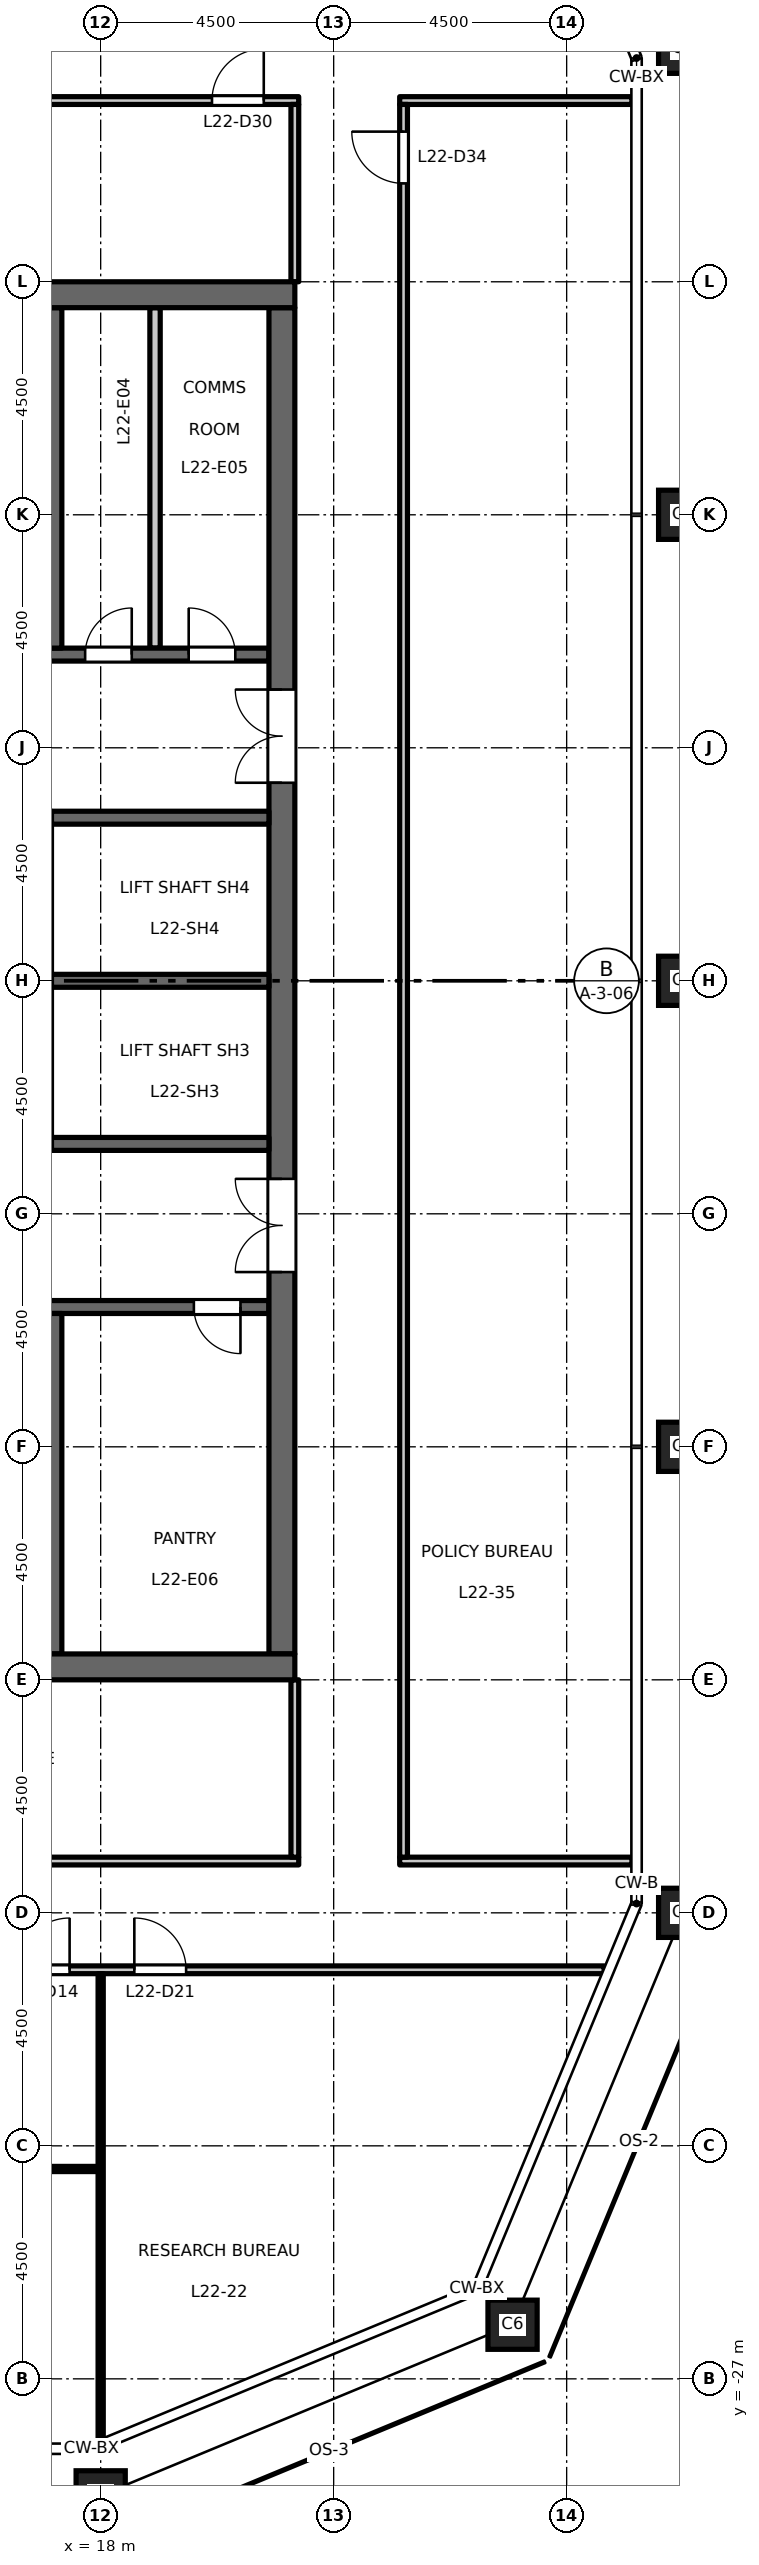
"""IFC4 building model, lengths in metres.
Left out: names, types, materials, properties, quantities, classifications, styles, units other than length and angle.
Written with IfcOpenShell. Run it as: python <this file> out.ifc"""

import sys

from ifc_helpers import new_model, si_unit, direction, frame, frame_2d, origin, origin_2d, place, context, subcontext, project, spatial, rectangle, hollow_rectangle, extrude, element, fill, save


model = new_model("IFC4")
c1 = context("Model", 3, precision=1e-05, world=origin(), true_north=direction((0.0, 1.0)))
c2 = subcontext(c1, "Body", "Model", "MODEL_VIEW")
j1 = project(units=[si_unit("LENGTHUNIT", "METRE"), si_unit("PLANEANGLEUNIT", "RADIAN")], contexts=[c1])
p1 = place(None, origin())
s1 = spatial("IfcSite", under=j1, at=p1, CompositionType="ELEMENT")
p2 = place(p1, origin())
s2 = spatial("IfcBuilding", under=s1, at=p2, CompositionType="ELEMENT")
p3 = place(p2, frame((0.0, 0.0, 104.7)))
s3 = spatial("IfcBuildingStorey", under=s2, at=p3, CompositionType="ELEMENT", Elevation=104.7)
for number, where, z_axis, x_axis in (
    (1, (18.0, -29.25, 0.0), (0.0, 0.0, 1.0), (1.0, 0.0, 0.0)),
    (2, (25.955, -25.955, 0.0), (0.0, 0.0, 1.0), (1.0, 0.0, 0.0)),
    (3, (29.25, -18.0, 0.0), (0.0, 0.0, 1.0), (1.0, 0.0, 0.0)),
    (4, (29.25, -9.0, 0.0), (0.0, 0.0, 1.0), (1.0, 0.0, 0.0)),
    (5, (29.25, 0.0, 0.0), (0.0, 0.0, 1.0), (1.0, 0.0, 0.0)),
    (6, (29.25, 9.0, 0.0), (0.0, 0.0, 1.0), (1.0, 0.0, 0.0)),
    (7, (29.25, 18.0, 0.0), (0.0, 0.0, 1.0), (1.0, 0.0, 0.0)),
):
    element("IfcColumn", number, at=place(p3, frame(where, z_axis=z_axis, x_axis=x_axis)), inside=s3, PredefinedType="COLUMN", context=c2, shape_type="SweptSolid", body=[
        extrude(hollow_rectangle(XDim=0.95, YDim=0.95, WallThickness=0.055, at=origin_2d()), origin(), (0.0, 0.0, 1.0), 4.5),
    ])
p4 = place(p3, frame((17.0, 6.3, 0.0), z_axis=(0.0, 0.0, 1.0), x_axis=(1.0, 0.0, 0.0)))
e8 = element("IfcWall", 8, at=p4, inside=s3, PredefinedType="SHEAR", context=c2, shape_type="SweptSolid", body=[
    extrude(rectangle(XDim=4.25, YDim=0.25, at=frame_2d((2.125, 0.0))), origin(), (0.0, 0.0, 1.0), 4.35),
])
p5 = place(p4, frame((0.7, 0.0, 0.0)))
e9 = element("IfcOpeningElement", 9, at=p5, cuts=e8, PredefinedType="OPENING", context=c2, shape_type="SweptSolid", body=[
    extrude(rectangle(XDim=0.9, YDim=2.1, at=frame_2d((0.45, 1.05))), frame((0.0, 0.135, 0.0), z_axis=(0.0, -1.0, 0.0), x_axis=(1.0, 0.0, 0.0)), (0.0, 0.0, 1.0), 0.27),
])
p6 = place(p4, frame((2.7, 0.0, 0.0)))
e10 = element("IfcOpeningElement", 10, at=p6, cuts=e8, PredefinedType="OPENING", context=c2, shape_type="SweptSolid", body=[
    extrude(rectangle(XDim=0.9, YDim=2.1, at=frame_2d((0.45, 1.05))), frame((0.0, 0.135, 0.0), z_axis=(0.0, -1.0, 0.0), x_axis=(1.0, 0.0, 0.0)), (0.0, 0.0, 1.0), 0.27),
])
p7 = place(p3, frame((12.15, -6.3, 0.0), z_axis=(0.0, 0.0, 1.0), x_axis=(1.0, 0.0, 0.0)))
e11 = element("IfcWall", 11, at=p7, inside=s3, PredefinedType="SHEAR", context=c2, shape_type="SweptSolid", body=[
    extrude(rectangle(XDim=9.1, YDim=0.25, at=frame_2d((4.55, 0.0))), origin(), (0.0, 0.0, 1.0), 4.35),
])
p8 = place(p7, frame((1.8, 0.0, 0.0)))
e12 = element("IfcOpeningElement", 12, at=p8, cuts=e11, PredefinedType="OPENING", context=c2, shape_type="SweptSolid", body=[
    extrude(rectangle(XDim=1.0, YDim=2.1, at=frame_2d((0.5, 1.05))), frame((0.0, 0.135, 0.0), z_axis=(0.0, -1.0, 0.0), x_axis=(1.0, 0.0, 0.0)), (0.0, 0.0, 1.0), 0.27),
])
p9 = place(p7, frame((7.65, 0.0, 0.0)))
e13 = element("IfcOpeningElement", 13, at=p9, cuts=e11, PredefinedType="OPENING", context=c2, shape_type="SweptSolid", body=[
    extrude(rectangle(XDim=0.9, YDim=2.1, at=frame_2d((0.45, 1.05))), frame((0.0, 0.135, 0.0), z_axis=(0.0, -1.0, 0.0), x_axis=(1.0, 0.0, 0.0)), (0.0, 0.0, 1.0), 0.27),
])
p10 = place(p3, frame((21.5, -13.0, 0.0), z_axis=(0.0, 0.0, 1.0), x_axis=(0.0, 1.0, 0.0)))
e14 = element("IfcWall", 14, at=p10, inside=s3, PredefinedType="SHEAR", context=c2, shape_type="SweptSolid", body=[
    extrude(rectangle(XDim=26.0, YDim=0.5, at=frame_2d((13.0, 0.0))), origin(), (0.0, 0.0, 1.0), 4.35),
])
p11 = place(p10, frame((16.825, 0.0, 0.0)))
e15 = element("IfcOpeningElement", 15, at=p11, cuts=e14, PredefinedType="OPENING", context=c2, shape_type="SweptSolid", body=[
    extrude(rectangle(XDim=1.8, YDim=2.1, at=frame_2d((0.9, 1.05))), frame((0.0, 0.26, 0.0), z_axis=(0.0, -1.0, 0.0), x_axis=(1.0, 0.0, 0.0)), (0.0, 0.0, 1.0), 0.52),
])
p12 = place(p10, frame((7.375, 0.0, 0.0)))
e16 = element("IfcOpeningElement", 16, at=p12, cuts=e14, PredefinedType="OPENING", context=c2, shape_type="SweptSolid", body=[
    extrude(rectangle(XDim=1.8, YDim=2.1, at=frame_2d((0.9, 1.05))), frame((0.0, 0.26, 0.0), z_axis=(0.0, -1.0, 0.0), x_axis=(1.0, 0.0, 0.0)), (0.0, 0.0, 1.0), 0.52),
])
p13 = place(p3, frame((19.05, 6.425, 0.0), z_axis=(0.0, 0.0, 1.0), x_axis=(0.0, 1.0, 0.0)))
e17 = element("IfcWall", 17, at=p13, inside=s3, PredefinedType="PARTITIONING", context=c2, shape_type="SweptSolid", body=[
    extrude(rectangle(XDim=6.575, YDim=0.2, at=frame_2d((3.288, 0.0))), origin(), (0.0, 0.0, 1.0), 4.35),
])
for number, where, z_axis, x_axis in (
    (18, (17.05, 0.0, 0.0), (0.0, 0.0, 1.0), (1.0, 0.0, 0.0)),
    (19, (17.05, 3.15, 0.0), (0.0, 0.0, 1.0), (1.0, 0.0, 0.0)),
    (20, (17.05, -3.15, 0.0), (0.0, 0.0, 1.0), (1.0, 0.0, 0.0)),
):
    element("IfcWall", number, at=place(p3, frame(where, z_axis=z_axis, x_axis=x_axis)), inside=s3, PredefinedType="SHEAR", context=c2, shape_type="SweptSolid", body=[
        extrude(rectangle(XDim=4.2, YDim=0.25, at=frame_2d((2.1, 0.0))), origin(), (0.0, 0.0, 1.0), 4.35),
    ])
for number, where, z_axis, x_axis in (
    (21, (17.0, 6.425, 0.0), (0.0, 0.0, 1.0), (0.0, 1.0, 0.0)),
    (22, (17.0, -13.0, 0.0), (0.0, 0.0, 1.0), (0.0, 1.0, 0.0)),
):
    element("IfcWall", number, at=place(p3, frame(where, z_axis=z_axis, x_axis=x_axis)), inside=s3, PredefinedType="SHEAR", context=c2, shape_type="SweptSolid", body=[
        extrude(rectangle(XDim=6.575, YDim=0.5, at=frame_2d((3.288, 0.0))), origin(), (0.0, 0.0, 1.0), 4.35),
    ])
for number, where, z_axis, x_axis in (
    (23, (8.25, 13.25, 0.0), (0.0, 0.0, 1.0), (1.0, 0.0, 0.0)),
    (24, (8.25, -13.25, 0.0), (0.0, 0.0, 1.0), (1.0, 0.0, 0.0)),
):
    element("IfcWall", number, at=place(p3, frame(where, z_axis=z_axis, x_axis=x_axis)), inside=s3, PredefinedType="SHEAR", context=c2, shape_type="SweptSolid", body=[
        extrude(rectangle(XDim=13.5, YDim=0.5, at=frame_2d((6.75, 0.0))), origin(), (0.0, 0.0, 1.0), 4.35),
    ])
p14 = place(p3, frame((9.05, -22.947, 0.0), z_axis=(0.0, 0.0, 1.0), x_axis=(1.0, 0.0, 0.0)))
e25 = element("IfcWall", 25, at=p14, inside=s3, PredefinedType="PARTITIONING", context=c2, shape_type="SweptSolid", body=[
    extrude(rectangle(XDim=8.9, YDim=0.1, at=frame_2d((4.45, 0.0))), origin(), (0.0, 0.0, 1.0), 4.35),
])
p15 = place(p14, frame((0.6, 0.0, 0.0)))
e26 = element("IfcOpeningElement", 26, at=p15, cuts=e25, PredefinedType="OPENING", context=c2, shape_type="SweptSolid", body=[
    extrude(rectangle(XDim=1.0, YDim=2.1, at=frame_2d((0.5, 1.05))), frame((0.0, 0.06, 0.0), z_axis=(0.0, -1.0, 0.0), x_axis=(1.0, 0.0, 0.0)), (0.0, 0.0, 1.0), 0.12),
])
p16 = place(p3, frame((-27.723, -19.1, 0.0), z_axis=(0.0, 0.0, 1.0), x_axis=(1.0, 0.0, 0.0)))
e27 = element("IfcWall", 27, at=p16, inside=s3, PredefinedType="PARTITIONING", context=c2, shape_type="SweptSolid", body=[
    extrude(rectangle(XDim=55.446, YDim=0.15, at=frame_2d((27.723, 0.0))), origin(), (0.0, 0.0, 1.0), 4.35),
])
p17 = place(p16, frame((10.373, 0.0, 0.0)))
e28 = element("IfcOpeningElement", 28, at=p17, cuts=e27, PredefinedType="OPENING", context=c2, shape_type="SweptSolid", body=[
    extrude(rectangle(XDim=1.0, YDim=2.1, at=frame_2d((0.5, 1.05))), frame((0.0, 0.085, 0.0), z_axis=(0.0, -1.0, 0.0), x_axis=(1.0, 0.0, 0.0)), (0.0, 0.0, 1.0), 0.17),
])
p18 = place(p16, frame((19.373, 0.0, 0.0)))
e29 = element("IfcOpeningElement", 29, at=p18, cuts=e27, PredefinedType="OPENING", context=c2, shape_type="SweptSolid", body=[
    extrude(rectangle(XDim=1.0, YDim=2.1, at=frame_2d((0.5, 1.05))), frame((0.0, 0.085, 0.0), z_axis=(0.0, -1.0, 0.0), x_axis=(1.0, 0.0, 0.0)), (0.0, 0.0, 1.0), 0.17),
])
p19 = place(p16, frame((35.123, 0.0, 0.0)))
e30 = element("IfcOpeningElement", 30, at=p19, cuts=e27, PredefinedType="OPENING", context=c2, shape_type="SweptSolid", body=[
    extrude(rectangle(XDim=1.0, YDim=2.1, at=frame_2d((0.5, 1.05))), frame((0.0, 0.085, 0.0), z_axis=(0.0, -1.0, 0.0), x_axis=(1.0, 0.0, 0.0)), (0.0, 0.0, 1.0), 0.17),
])
p20 = place(p16, frame((44.123, 0.0, 0.0)))
e31 = element("IfcOpeningElement", 31, at=p20, cuts=e27, PredefinedType="OPENING", context=c2, shape_type="SweptSolid", body=[
    extrude(rectangle(XDim=1.0, YDim=2.1, at=frame_2d((0.5, 1.05))), frame((0.0, 0.085, 0.0), z_axis=(0.0, -1.0, 0.0), x_axis=(1.0, 0.0, 0.0)), (0.0, 0.0, 1.0), 0.17),
])
p21 = place(p16, frame((0.65, 0.0, 0.0)))
e32 = element("IfcOpeningElement", 32, at=p21, cuts=e27, PredefinedType="OPENING", context=c2, shape_type="SweptSolid", body=[
    extrude(rectangle(XDim=1.0, YDim=2.1, at=frame_2d((0.5, 1.05))), frame((0.0, 0.085, 0.0), z_axis=(0.0, -1.0, 0.0), x_axis=(1.0, 0.0, 0.0)), (0.0, 0.0, 1.0), 0.17),
])
p22 = place(p16, frame((46.373, 0.0, 0.0)))
e33 = element("IfcOpeningElement", 33, at=p22, cuts=e27, PredefinedType="OPENING", context=c2, shape_type="SweptSolid", body=[
    extrude(rectangle(XDim=1.0, YDim=2.1, at=frame_2d((0.5, 1.05))), frame((0.0, 0.085, 0.0), z_axis=(0.0, -1.0, 0.0), x_axis=(1.0, 0.0, 0.0)), (0.0, 0.0, 1.0), 0.17),
])
p23 = place(p3, frame((-21.825, -17.0, 0.0), z_axis=(0.0, 0.0, 1.0), x_axis=(1.0, 0.0, 0.0)))
e34 = element("IfcWall", 34, at=p23, inside=s3, PredefinedType="PARTITIONING", context=c2, shape_type="SweptSolid", body=[
    extrude(rectangle(XDim=43.65, YDim=0.15, at=frame_2d((21.825, 0.0))), origin(), (0.0, 0.0, 1.0), 4.35),
])
p24 = place(p23, frame((14.175, 0.0, 0.0)))
e35 = element("IfcOpeningElement", 35, at=p24, cuts=e34, PredefinedType="OPENING", context=c2, shape_type="SweptSolid", body=[
    extrude(rectangle(XDim=1.0, YDim=2.1, at=frame_2d((0.5, 1.05))), frame((0.0, 0.085, 0.0), z_axis=(0.0, -1.0, 0.0), x_axis=(1.0, 0.0, 0.0)), (0.0, 0.0, 1.0), 0.17),
])
p25 = place(p23, frame((11.925, 0.0, 0.0)))
e36 = element("IfcOpeningElement", 36, at=p25, cuts=e34, PredefinedType="OPENING", context=c2, shape_type="SweptSolid", body=[
    extrude(rectangle(XDim=1.0, YDim=2.1, at=frame_2d((0.5, 1.05))), frame((0.0, 0.085, 0.0), z_axis=(0.0, -1.0, 0.0), x_axis=(1.0, 0.0, 0.0)), (0.0, 0.0, 1.0), 0.17),
])
p26 = place(p23, frame((30.675, 0.0, 0.0)))
e37 = element("IfcOpeningElement", 37, at=p26, cuts=e34, PredefinedType="OPENING", context=c2, shape_type="SweptSolid", body=[
    extrude(rectangle(XDim=1.0, YDim=2.1, at=frame_2d((0.5, 1.05))), frame((0.0, 0.085, 0.0), z_axis=(0.0, -1.0, 0.0), x_axis=(1.0, 0.0, 0.0)), (0.0, 0.0, 1.0), 0.17),
])
p27 = place(p3, frame((23.775, -17.0, 0.0), z_axis=(0.0, 0.0, 1.0), x_axis=(1.0, 0.0, 0.0)))
e38 = element("IfcWall", 38, at=p27, inside=s3, PredefinedType="PARTITIONING", context=c2, shape_type="SweptSolid", body=[
    extrude(rectangle(XDim=4.485, YDim=0.15, at=frame_2d((2.243, 0.0))), origin(), (0.0, 0.0, 1.0), 4.35),
])
p28 = place(p3, frame((-21.825, 17.0, 0.0), z_axis=(0.0, 0.0, 1.0), x_axis=(1.0, 0.0, 0.0)))
e39 = element("IfcWall", 39, at=p28, inside=s3, PredefinedType="PARTITIONING", context=c2, shape_type="SweptSolid", body=[
    extrude(rectangle(XDim=43.65, YDim=0.15, at=frame_2d((21.825, 0.0))), origin(), (0.0, 0.0, 1.0), 4.35),
])
p29 = place(p28, frame((20.225, 0.0, 0.0)))
e40 = element("IfcOpeningElement", 40, at=p29, cuts=e39, PredefinedType="OPENING", context=c2, shape_type="SweptSolid", body=[
    extrude(rectangle(XDim=1.0, YDim=2.1, at=frame_2d((0.5, 1.05))), frame((0.0, 0.085, 0.0), z_axis=(0.0, -1.0, 0.0), x_axis=(1.0, 0.0, 0.0)), (0.0, 0.0, 1.0), 0.17),
])
p30 = place(p28, frame((22.475, 0.0, 0.0)))
e41 = element("IfcOpeningElement", 41, at=p30, cuts=e39, PredefinedType="OPENING", context=c2, shape_type="SweptSolid", body=[
    extrude(rectangle(XDim=1.0, YDim=2.1, at=frame_2d((0.5, 1.05))), frame((0.0, 0.085, 0.0), z_axis=(0.0, -1.0, 0.0), x_axis=(1.0, 0.0, 0.0)), (0.0, 0.0, 1.0), 0.17),
])
p31 = place(p28, frame((0.725, 0.0, 0.0)))
e42 = element("IfcOpeningElement", 42, at=p31, cuts=e39, PredefinedType="OPENING", context=c2, shape_type="SweptSolid", body=[
    extrude(rectangle(XDim=1.0, YDim=2.1, at=frame_2d((0.5, 1.05))), frame((0.0, 0.085, 0.0), z_axis=(0.0, -1.0, 0.0), x_axis=(1.0, 0.0, 0.0)), (0.0, 0.0, 1.0), 0.17),
])
p32 = place(p28, frame((41.975, 0.0, 0.0)))
e43 = element("IfcOpeningElement", 43, at=p32, cuts=e39, PredefinedType="OPENING", context=c2, shape_type="SweptSolid", body=[
    extrude(rectangle(XDim=1.0, YDim=2.1, at=frame_2d((0.5, 1.05))), frame((0.0, 0.085, 0.0), z_axis=(0.0, -1.0, 0.0), x_axis=(1.0, 0.0, 0.0)), (0.0, 0.0, 1.0), 0.17),
])
p33 = place(p3, frame((23.775, 17.0, 0.0), z_axis=(0.0, 0.0, 1.0), x_axis=(1.0, 0.0, 0.0)))
e44 = element("IfcWall", 44, at=p33, inside=s3, PredefinedType="PARTITIONING", context=c2, shape_type="SweptSolid", body=[
    extrude(rectangle(XDim=4.485, YDim=0.15, at=frame_2d((2.243, 0.0))), origin(), (0.0, 0.0, 1.0), 4.35),
])
p34 = place(p3, frame((18.0, -28.178, 0.0), z_axis=(0.0, 0.0, 1.0), x_axis=(0.0, 1.0, 0.0)))
e45 = element("IfcWall", 45, at=p34, inside=s3, PredefinedType="PARTITIONING", context=c2, shape_type="SweptSolid", body=[
    extrude(rectangle(XDim=9.003, YDim=0.1, at=frame_2d((4.501, 0.0))), origin(), (0.0, 0.0, 1.0), 3.45),
])
for number, where, z_axis, x_axis in (
    (46, (21.75, -16.925, 0.0), (0.0, 0.0, 1.0), (0.0, 1.0, 0.0)),
    (47, (21.75, 13.5, 0.0), (0.0, 0.0, 1.0), (0.0, 1.0, 0.0)),
):
    element("IfcWall", number, at=place(p3, frame(where, z_axis=z_axis, x_axis=x_axis)), inside=s3, PredefinedType="PARTITIONING", context=c2, shape_type="SweptSolid", body=[
        extrude(rectangle(XDim=3.425, YDim=0.15, at=frame_2d((1.712, 0.0))), origin(), (0.0, 0.0, 1.0), 4.35),
    ])
p35 = place(p3, frame((23.85, -16.925, 0.0), z_axis=(0.0, 0.0, 1.0), x_axis=(0.0, 1.0, 0.0)))
e48 = element("IfcWall", 48, at=p35, inside=s3, PredefinedType="PARTITIONING", context=c2, shape_type="SweptSolid", body=[
    extrude(rectangle(XDim=33.85, YDim=0.15, at=frame_2d((16.925, 0.0))), origin(), (0.0, 0.0, 1.0), 4.35),
])
p36 = place(p35, frame((32.325, 0.0, 0.0)))
e49 = element("IfcOpeningElement", 49, at=p36, cuts=e48, PredefinedType="OPENING", context=c2, shape_type="SweptSolid", body=[
    extrude(rectangle(XDim=1.0, YDim=2.1, at=frame_2d((0.5, 1.05))), frame((0.0, 0.085, 0.0), z_axis=(0.0, -1.0, 0.0), x_axis=(1.0, 0.0, 0.0)), (0.0, 0.0, 1.0), 0.17),
])
p37 = place(p11, origin())
e50 = element("IfcDoor", 50, at=p37, inside=s3, OperationType="DOUBLE_DOOR_DOUBLE_SWING", PredefinedType="DOOR", context=c2, shape_type="SweptSolid", body=[
    extrude(rectangle(XDim=1.8, YDim=2.1, at=frame_2d((0.9, 1.05))), frame((0.0, 0.025, 0.0), z_axis=(0.0, -1.0, 0.0), x_axis=(1.0, 0.0, 0.0)), (0.0, 0.0, 1.0), 0.05),
])
fill(e15, e50)
p38 = place(p12, origin())
e51 = element("IfcDoor", 51, at=p38, inside=s3, OperationType="DOUBLE_DOOR_DOUBLE_SWING", PredefinedType="DOOR", context=c2, shape_type="SweptSolid", body=[
    extrude(rectangle(XDim=1.8, YDim=2.1, at=frame_2d((0.9, 1.05))), frame((0.0, 0.025, 0.0), z_axis=(0.0, -1.0, 0.0), x_axis=(1.0, 0.0, 0.0)), (0.0, 0.0, 1.0), 0.05),
])
fill(e16, e51)
p39 = place(p5, origin())
e52 = element("IfcDoor", 52, at=p39, inside=s3, OperationType="SINGLE_SWING_LEFT", PredefinedType="DOOR", context=c2, shape_type="SweptSolid", body=[
    extrude(rectangle(XDim=0.9, YDim=2.1, at=frame_2d((0.45, 1.05))), frame((0.0, 0.025, 0.0), z_axis=(0.0, -1.0, 0.0), x_axis=(1.0, 0.0, 0.0)), (0.0, 0.0, 1.0), 0.05),
])
fill(e9, e52)
p40 = place(p6, origin())
e53 = element("IfcDoor", 53, at=p40, inside=s3, OperationType="SINGLE_SWING_RIGHT", PredefinedType="DOOR", context=c2, shape_type="SweptSolid", body=[
    extrude(rectangle(XDim=0.9, YDim=2.1, at=frame_2d((0.45, 1.05))), frame((0.0, 0.025, 0.0), z_axis=(0.0, -1.0, 0.0), x_axis=(1.0, 0.0, 0.0)), (0.0, 0.0, 1.0), 0.05),
])
fill(e10, e53)
p41 = place(p9, origin())
e54 = element("IfcDoor", 54, at=p41, inside=s3, OperationType="SINGLE_SWING_RIGHT", PredefinedType="DOOR", context=c2, shape_type="SweptSolid", body=[
    extrude(rectangle(XDim=0.9, YDim=2.1, at=frame_2d((0.45, 1.05))), frame((0.0, 0.025, 0.0), z_axis=(0.0, -1.0, 0.0), x_axis=(1.0, 0.0, 0.0)), (0.0, 0.0, 1.0), 0.05),
])
fill(e13, e54)
p42 = place(p20, origin())
e55 = element("IfcDoor", 55, at=p42, inside=s3, OperationType="SINGLE_SWING_RIGHT", PredefinedType="DOOR", context=c2, shape_type="SweptSolid", body=[
    extrude(rectangle(XDim=1.0, YDim=2.1, at=frame_2d((0.5, 1.05))), frame((0.0, 0.025, 0.0), z_axis=(0.0, -1.0, 0.0), x_axis=(1.0, 0.0, 0.0)), (0.0, 0.0, 1.0), 0.05),
])
fill(e31, e55)
p43 = place(p22, origin())
e56 = element("IfcDoor", 56, at=p43, inside=s3, OperationType="SINGLE_SWING_LEFT", PredefinedType="DOOR", context=c2, shape_type="SweptSolid", body=[
    extrude(rectangle(XDim=1.0, YDim=2.1, at=frame_2d((0.5, 1.05))), frame((0.0, 0.025, 0.0), z_axis=(0.0, -1.0, 0.0), x_axis=(1.0, 0.0, 0.0)), (0.0, 0.0, 1.0), 0.05),
])
fill(e33, e56)
p44 = place(p32, origin())
e57 = element("IfcDoor", 57, at=p44, inside=s3, OperationType="SINGLE_SWING_RIGHT", PredefinedType="DOOR", context=c2, shape_type="SweptSolid", body=[
    extrude(rectangle(XDim=1.0, YDim=2.1, at=frame_2d((0.5, 1.05))), frame((0.0, 0.025, 0.0), z_axis=(0.0, -1.0, 0.0), x_axis=(1.0, 0.0, 0.0)), (0.0, 0.0, 1.0), 0.05),
])
fill(e43, e57)
p45 = place(p36, origin())
e58 = element("IfcDoor", 58, at=p45, inside=s3, OperationType="SINGLE_SWING_RIGHT", PredefinedType="DOOR", context=c2, shape_type="SweptSolid", body=[
    extrude(rectangle(XDim=1.0, YDim=2.1, at=frame_2d((0.5, 1.05))), frame((0.0, 0.025, 0.0), z_axis=(0.0, -1.0, 0.0), x_axis=(1.0, 0.0, 0.0)), (0.0, 0.0, 1.0), 0.05),
])
fill(e49, e58)
save(model, sys.argv[1])
